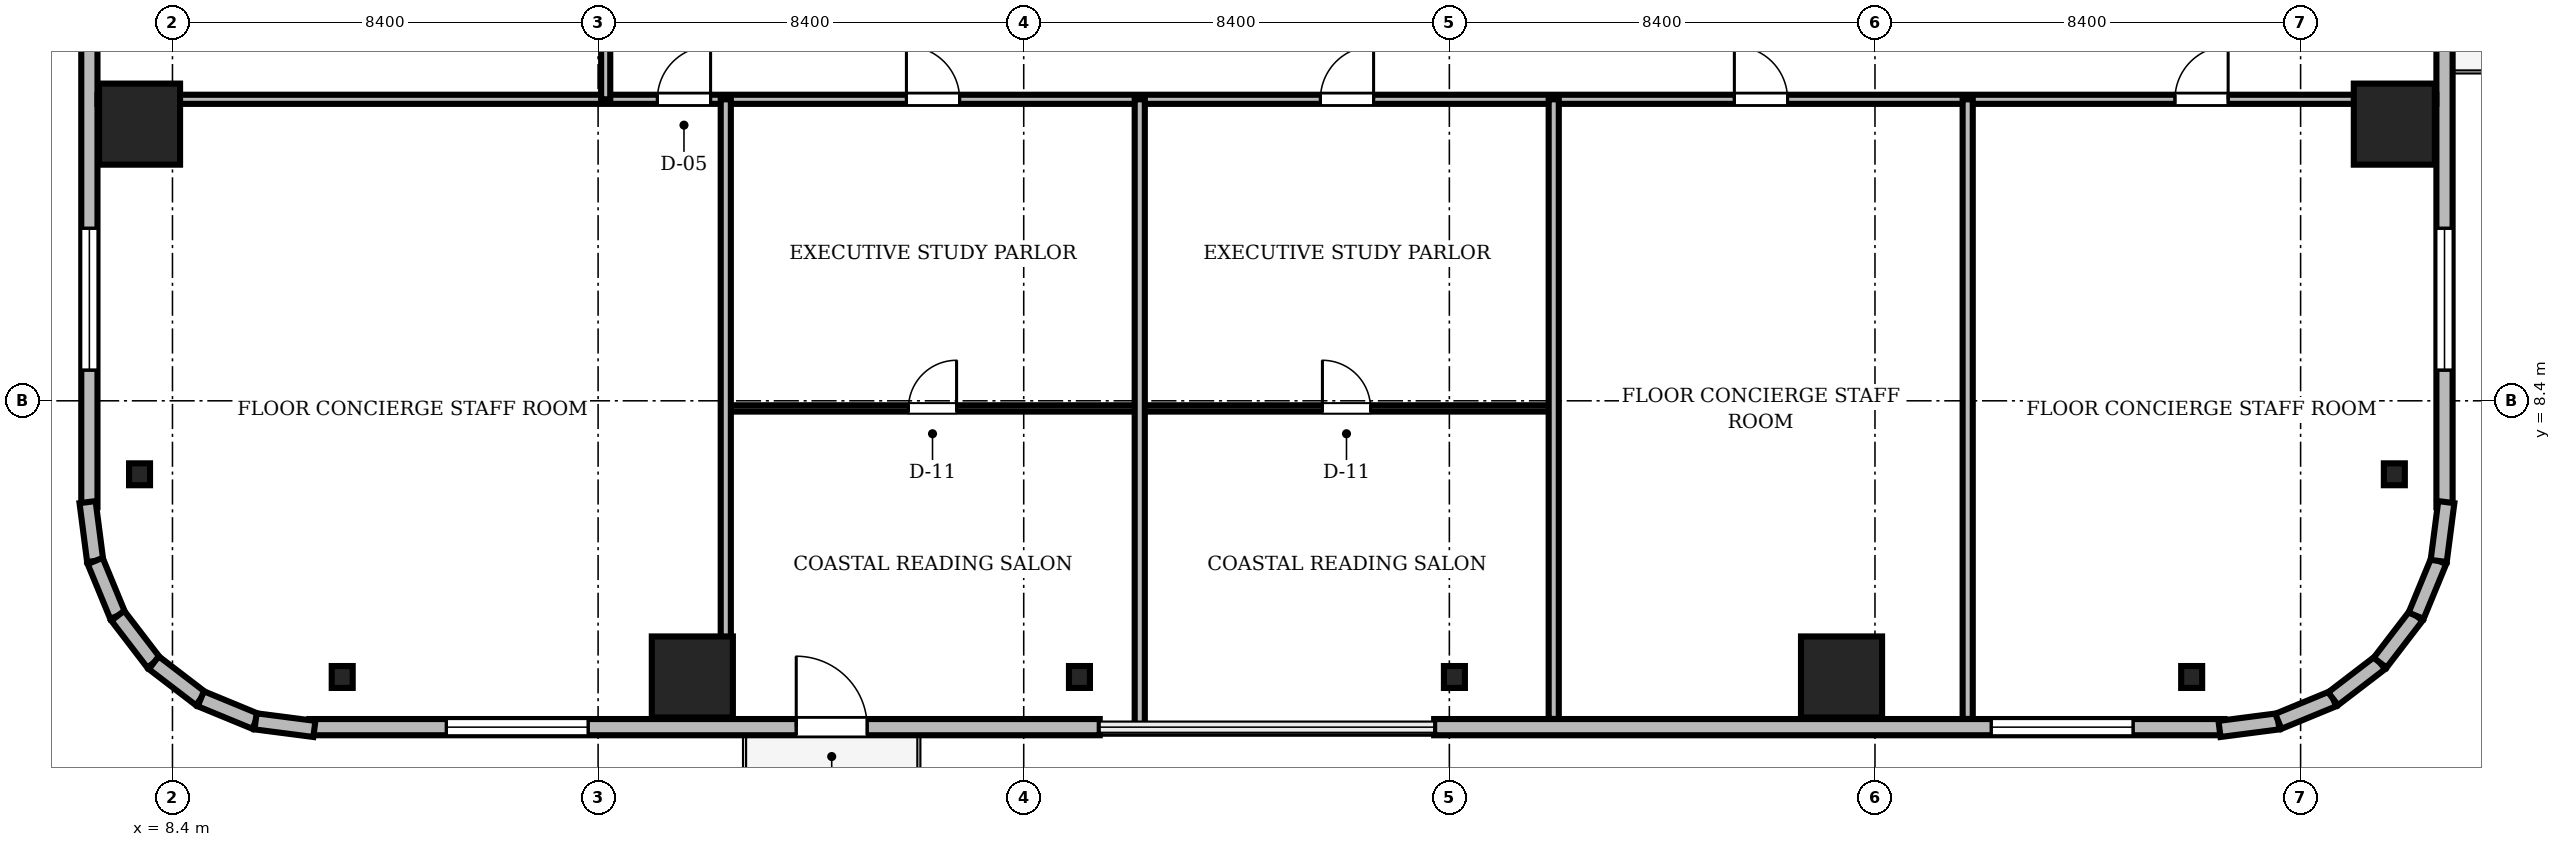
"""IFC4 building model, lengths in metres.
Left out: names, types, materials, properties, quantities, classifications, styles, units other than length and angle.
Written with IfcOpenShell. Run it as: python <this file> out.ifc"""

import sys

from ifc_helpers import new_model, si_unit, direction, frame, frame_2d, origin, origin_2d, place, context, subcontext, project, spatial, rectangle, i_section, extrude, source, transform, mapped, element, fill, save


model = new_model("IFC4")
c1 = context("Model", 3, precision=1e-05, world=origin(), true_north=direction((0.0, 1.0)))
c2 = subcontext(c1, "Body", "Model", "MODEL_VIEW")
j1 = project(units=[si_unit("LENGTHUNIT", "METRE"), si_unit("PLANEANGLEUNIT", "RADIAN")], contexts=[c1])
p1 = place(None, origin())
s1 = spatial("IfcSite", under=j1, at=p1, CompositionType="ELEMENT")
p2 = place(p1, origin())
s2 = spatial("IfcBuilding", under=s1, at=p2, CompositionType="ELEMENT")
p3 = place(p2, frame((0.0, 0.0, 163.1)))
s3 = spatial("IfcBuildingStorey", under=s2, at=p3, CompositionType="ELEMENT", Elevation=163.1)
m1 = source(origin(), c2, "Body", "SweptSolid", [
    extrude(rectangle(XDim=1.6, YDim=1.6, at=origin_2d()), origin(), (0.0, 0.0, 1.0), 3.05),
])
for number, where, z_axis, x_axis in (
    (1, (18.66, 2.95, 0.0), (0.0, 0.0, 1.0), (1.0, 0.0, 0.0)),
    (2, (41.34, 2.95, 0.0), (0.0, 0.0, 1.0), (1.0, 0.0, 0.0)),
    (3, (52.25, 13.86, 0.0), (0.0, 0.0, 1.0), (1.0, 0.0, 0.0)),
    (4, (7.75, 13.86, 0.0), (0.0, 0.0, 1.0), (1.0, 0.0, 0.0)),
):
    element("IfcColumn", number, at=place(p3, frame(where, z_axis=z_axis, x_axis=x_axis)), inside=s3, PredefinedType="COLUMN", context=c2, shape_type="MappedRepresentation", body=[
        mapped(m1, transform((0.0, 0.0, 0.0), scale=1.0)),
    ])
m2 = source(origin(), c2, "Body", "SweptSolid", [
    extrude(i_section(OverallWidth=0.414, OverallDepth=0.432, WebThickness=0.026, FlangeThickness=0.04, FilletRadius=0.015, at=origin_2d()), origin(), (0.0, 0.0, 1.0), 3.05),
])
for number, where, z_axis, x_axis in (
    (5, (11.75, 2.95, 0.0), (0.0, 0.0, 1.0), (1.0, 0.0, 0.0)),
    (6, (26.3, 2.95, 0.0), (0.0, 0.0, 1.0), (1.0, 0.0, 0.0)),
    (7, (33.7, 2.95, 0.0), (0.0, 0.0, 1.0), (1.0, 0.0, 0.0)),
    (8, (48.25, 2.95, 0.0), (0.0, 0.0, 1.0), (1.0, 0.0, 0.0)),
    (9, (52.25, 6.95, 0.0), (0.0, 0.0, 1.0), (1.0, 0.0, 0.0)),
    (10, (7.75, 6.95, 0.0), (0.0, 0.0, 1.0), (1.0, 0.0, 0.0)),
):
    element("IfcColumn", number, at=place(p3, frame(where, z_axis=z_axis, x_axis=x_axis)), inside=s3, PredefinedType="COLUMN", context=c2, shape_type="MappedRepresentation", body=[
        mapped(m2, transform((0.0, 0.0, 0.0), scale=1.0)),
    ])
m3 = source(origin(), c2, "Body", "SweptSolid", [
    extrude(rectangle(XDim=15.6, YDim=0.32, at=frame_2d((7.8, 0.0))), origin(), (0.0, 0.0, 1.0), 3.05),
])
p4 = place(p3, frame((11.1, 1.96, 0.0), z_axis=(0.0, 0.0, 1.0), x_axis=(1.0, 0.0, 0.0)))
e11 = element("IfcWall", 11, at=p4, inside=s3, PredefinedType="SOLIDWALL", context=c2, shape_type="MappedRepresentation", body=[
    mapped(m3, transform((0.0, 0.0, 0.0), scale=1.0)),
])
m4 = source(origin(), c2, "Body", "SweptSolid", [
    extrude(rectangle(XDim=1.4, YDim=2.3, at=frame_2d((0.7, 1.15))), frame((0.0, 0.17, 0.0), z_axis=(0.0, -1.0, 0.0), x_axis=(1.0, 0.0, 0.0)), (0.0, 0.0, 1.0), 0.34),
])
p5 = place(p4, frame((9.61, 0.0, 0.0)))
e12 = element("IfcOpeningElement", 12, at=p5, cuts=e11, PredefinedType="OPENING", context=c2, shape_type="MappedRepresentation", body=[
    mapped(m4, transform((0.0, 0.0, 0.0), scale=1.0)),
])
m5 = source(origin(), c2, "Body", "SweptSolid", [
    extrude(rectangle(XDim=2.8, YDim=2.4, at=frame_2d((1.4, 1.2))), frame((0.0, 0.17, 0.0), z_axis=(0.0, -1.0, 0.0), x_axis=(1.0, 0.0, 0.0)), (0.0, 0.0, 1.0), 0.34),
])
p6 = place(p4, frame((2.705, 0.0, 0.39)))
e13 = element("IfcOpeningElement", 13, at=p6, cuts=e11, PredefinedType="OPENING", context=c2, shape_type="MappedRepresentation", body=[
    mapped(m5, transform((0.0, 0.0, 0.0), scale=1.0)),
])
p7 = place(p3, frame((33.3, 1.96, 0.0), z_axis=(0.0, 0.0, 1.0), x_axis=(1.0, 0.0, 0.0)))
e14 = element("IfcWall", 14, at=p7, inside=s3, PredefinedType="SOLIDWALL", context=c2, shape_type="MappedRepresentation", body=[
    mapped(m3, transform((0.0, 0.0, 0.0), scale=1.0)),
])
p8 = place(p7, frame((10.995, 0.0, 0.39)))
e15 = element("IfcOpeningElement", 15, at=p8, cuts=e14, PredefinedType="OPENING", context=c2, shape_type="MappedRepresentation", body=[
    mapped(m5, transform((0.0, 0.0, 0.0), scale=1.0)),
])
p9 = place(p3, frame((6.76, 21.9, 0.0), z_axis=(0.0, 0.0, 1.0), x_axis=(0.0, -1.0, 0.0)))
e16 = element("IfcWall", 16, at=p9, inside=s3, PredefinedType="SOLIDWALL", context=c2, shape_type="MappedRepresentation", body=[
    mapped(m3, transform((0.0, 0.0, 0.0), scale=1.0)),
])
p10 = place(p9, frame((10.095, 0.0, 0.39)))
e17 = element("IfcOpeningElement", 17, at=p10, cuts=e16, PredefinedType="OPENING", context=c2, shape_type="MappedRepresentation", body=[
    mapped(m5, transform((0.0, 0.0, 0.0), scale=1.0)),
])
p11 = place(p3, frame((53.24, 6.3, 0.0), z_axis=(0.0, 0.0, 1.0), x_axis=(0.0, 1.0, 0.0)))
e18 = element("IfcWall", 18, at=p11, inside=s3, PredefinedType="SOLIDWALL", context=c2, shape_type="MappedRepresentation", body=[
    mapped(m3, transform((0.0, 0.0, 0.0), scale=1.0)),
])
p12 = place(p11, frame((9.61, 0.0, 0.0)))
e19 = element("IfcOpeningElement", 19, at=p12, cuts=e18, PredefinedType="OPENING", context=c2, shape_type="MappedRepresentation", body=[
    mapped(m4, transform((0.0, 0.0, 0.0), scale=1.0)),
])
p13 = place(p11, frame((2.705, 0.0, 0.39)))
e20 = element("IfcOpeningElement", 20, at=p13, cuts=e18, PredefinedType="OPENING", context=c2, shape_type="MappedRepresentation", body=[
    mapped(m5, transform((0.0, 0.0, 0.0), scale=1.0)),
])
m6 = source(origin(), c2, "Body", "SweptSolid", [
    extrude(rectangle(XDim=1.171, YDim=0.32, at=frame_2d((0.585, 0.0))), origin(), (0.0, 0.0, 1.0), 3.05),
])
p14 = place(p3, frame((6.724, 6.401, 0.0), z_axis=(0.0, 0.0, 1.0), x_axis=(0.128269133229, -0.991739395941, 0.0)))
e21 = element("IfcWall", 21, at=p14, inside=s3, PredefinedType="SOLIDWALL", context=c2, shape_type="MappedRepresentation", body=[
    mapped(m6, transform((0.0, 0.0, 0.0), scale=1.0)),
])
m7 = source(origin(), c2, "Body", "SweptSolid", [
    extrude(rectangle(XDim=1.169, YDim=0.32, at=frame_2d((0.584, 0.0))), origin(), (0.0, 0.0, 1.0), 3.05),
])
for number, where, z_axis, x_axis in (
    (22, (6.875, 5.24, 0.0), (0.0, 0.0, 1.0), (0.381, -0.925, 0.0)),
    (23, (7.32, 4.159, 0.0), (0.0, 0.0, 1.0), (0.608, -0.794, 0.0)),
):
    element("IfcWall", number, at=place(p3, frame(where, z_axis=z_axis, x_axis=x_axis)), inside=s3, PredefinedType="SOLIDWALL", context=c2, shape_type="MappedRepresentation", body=[
        mapped(m7, transform((0.0, 0.0, 0.0), scale=1.0)),
    ])
m8 = source(origin(), c2, "Body", "SweptSolid", [
    extrude(rectangle(XDim=1.169, YDim=0.32, at=frame_2d((0.584, 0.0))), origin(), (0.0, 0.0, 1.0), 3.05),
])
p15 = place(p3, frame((8.031, 3.231, 0.0), z_axis=(0.0, 0.0, 1.0), x_axis=(0.793663520347, -0.608356981114, 0.0)))
e24 = element("IfcWall", 24, at=p15, inside=s3, PredefinedType="SOLIDWALL", context=c2, shape_type="MappedRepresentation", body=[
    mapped(m8, transform((0.0, 0.0, 0.0), scale=1.0)),
])
m9 = source(origin(), c2, "Body", "SweptSolid", [
    extrude(rectangle(XDim=1.169, YDim=0.32, at=frame_2d((0.585, 0.0))), origin(), (0.0, 0.0, 1.0), 3.05),
])
p16 = place(p3, frame((8.959, 2.52, 0.0), z_axis=(0.0, 0.0, 1.0), x_axis=(0.924479075121, -0.381232789334, 0.0)))
e25 = element("IfcWall", 25, at=p16, inside=s3, PredefinedType="SOLIDWALL", context=c2, shape_type="MappedRepresentation", body=[
    mapped(m9, transform((0.0, 0.0, 0.0), scale=1.0)),
])
m10 = source(origin(), c2, "Body", "SweptSolid", [
    extrude(rectangle(XDim=1.17, YDim=0.32, at=frame_2d((0.585, 0.0))), origin(), (0.0, 0.0, 1.0), 3.05),
])
for number, where, z_axis, x_axis in (
    (26, (10.04, 2.074, 0.0), (0.0, 0.0, 1.0), (0.992, -0.128, 0.0)),
    (27, (48.8, 1.925, 0.0), (0.0, 0.0, 1.0), (0.992, 0.128, 0.0)),
):
    element("IfcWall", number, at=place(p3, frame(where, z_axis=z_axis, x_axis=x_axis)), inside=s3, PredefinedType="SOLIDWALL", context=c2, shape_type="MappedRepresentation", body=[
        mapped(m10, transform((0.0, 0.0, 0.0), scale=1.0)),
    ])
p17 = place(p3, frame((49.96, 2.074, 0.0), z_axis=(0.0, 0.0, 1.0), x_axis=(0.924479075121, 0.381232789334, 0.0)))
e28 = element("IfcWall", 28, at=p17, inside=s3, PredefinedType="SOLIDWALL", context=c2, shape_type="MappedRepresentation", body=[
    mapped(m9, transform((0.0, 0.0, 0.0), scale=1.0)),
])
p18 = place(p3, frame((51.041, 2.52, 0.0), z_axis=(0.0, 0.0, 1.0), x_axis=(0.793663520347, 0.608356981114, 0.0)))
e29 = element("IfcWall", 29, at=p18, inside=s3, PredefinedType="SOLIDWALL", context=c2, shape_type="MappedRepresentation", body=[
    mapped(m8, transform((0.0, 0.0, 0.0), scale=1.0)),
])
for number, where, z_axis, x_axis in (
    (30, (51.969, 3.231, 0.0), (0.0, 0.0, 1.0), (0.608, 0.794, 0.0)),
    (31, (52.68, 4.159, 0.0), (0.0, 0.0, 1.0), (0.381, 0.925, 0.0)),
):
    element("IfcWall", number, at=place(p3, frame(where, z_axis=z_axis, x_axis=x_axis)), inside=s3, PredefinedType="SOLIDWALL", context=c2, shape_type="MappedRepresentation", body=[
        mapped(m7, transform((0.0, 0.0, 0.0), scale=1.0)),
    ])
p19 = place(p3, frame((53.125, 5.24, 0.0), z_axis=(0.0, 0.0, 1.0), x_axis=(0.128269133229, 0.991739395941, 0.0)))
e32 = element("IfcWall", 32, at=p19, inside=s3, PredefinedType="SOLIDWALL", context=c2, shape_type="MappedRepresentation", body=[
    mapped(m6, transform((0.0, 0.0, 0.0), scale=1.0)),
])
m11 = source(origin(), c2, "Body", "SweptSolid", [
    extrude(rectangle(XDim=46.156, YDim=0.18, at=frame_2d((23.078, 0.0))), origin(), (0.0, 0.0, 1.0), 2.326),
])
p20 = place(p3, frame((6.922, 14.35, 0.0), z_axis=(0.0, 0.0, 1.0), x_axis=(1.0, 0.0, 0.0)))
e33 = element("IfcWall", 33, at=p20, inside=s3, PredefinedType="PARTITIONING", context=c2, shape_type="MappedRepresentation", body=[
    mapped(m11, transform((0.0, 0.0, 0.0), scale=1.0)),
])
m12 = source(origin(), c2, "Body", "SweptSolid", [
    extrude(rectangle(XDim=1.05, YDim=2.2, at=frame_2d((0.525, 1.1))), frame((0.0, 0.1, 0.0), z_axis=(0.0, -1.0, 0.0), x_axis=(1.0, 0.0, 0.0)), (0.0, 0.0, 1.0), 0.2),
])
p21 = place(p20, frame((11.048, 0.0, 0.0)))
e34 = element("IfcOpeningElement", 34, at=p21, cuts=e33, PredefinedType="OPENING", context=c2, shape_type="MappedRepresentation", body=[
    mapped(m12, transform((0.0, 0.0, 0.0), scale=1.0)),
])
p22 = place(p20, frame((15.963, 0.0, 0.0)))
e35 = element("IfcOpeningElement", 35, at=p22, cuts=e33, PredefinedType="OPENING", context=c2, shape_type="MappedRepresentation", body=[
    mapped(m12, transform((0.0, 0.0, 0.0), scale=1.0)),
])
p23 = place(p20, frame((24.133, 0.0, 0.0)))
e36 = element("IfcOpeningElement", 36, at=p23, cuts=e33, PredefinedType="OPENING", context=c2, shape_type="MappedRepresentation", body=[
    mapped(m12, transform((0.0, 0.0, 0.0), scale=1.0)),
])
p24 = place(p20, frame((32.303, 0.0, 0.0)))
e37 = element("IfcOpeningElement", 37, at=p24, cuts=e33, PredefinedType="OPENING", context=c2, shape_type="MappedRepresentation", body=[
    mapped(m12, transform((0.0, 0.0, 0.0), scale=1.0)),
])
p25 = place(p20, frame((40.998, 0.0, 0.0)))
e38 = element("IfcOpeningElement", 38, at=p25, cuts=e33, PredefinedType="OPENING", context=c2, shape_type="MappedRepresentation", body=[
    mapped(m12, transform((0.0, 0.0, 0.0), scale=1.0)),
])
m13 = source(origin(), c2, "Body", "SweptSolid", [
    extrude(rectangle(XDim=8.17, YDim=0.125, at=frame_2d((4.085, 0.0))), origin(), (0.0, 0.0, 1.0), 2.492),
])
p26 = place(p3, frame((19.32, 8.25, 0.0), z_axis=(0.0, 0.0, 1.0), x_axis=(1.0, 0.0, 0.0)))
e39 = element("IfcWall", 39, at=p26, inside=s3, PredefinedType="PARTITIONING", context=c2, shape_type="MappedRepresentation", body=[
    mapped(m13, transform((0.0, 0.0, 0.0), scale=1.0)),
])
m14 = source(origin(), c2, "Body", "SweptSolid", [
    extrude(rectangle(XDim=0.95, YDim=2.15, at=frame_2d((0.475, 1.075))), frame((0.0, 0.073, 0.0), z_axis=(0.0, -1.0, 0.0), x_axis=(1.0, 0.0, 0.0)), (0.0, 0.0, 1.0), 0.145),
])
p27 = place(p26, frame((3.605, 0.0, 0.0)))
e40 = element("IfcOpeningElement", 40, at=p27, cuts=e39, PredefinedType="OPENING", context=c2, shape_type="MappedRepresentation", body=[
    mapped(m14, transform((0.0, 0.0, 0.0), scale=1.0)),
])
p28 = place(p3, frame((27.49, 8.25, 0.0), z_axis=(0.0, 0.0, 1.0), x_axis=(1.0, 0.0, 0.0)))
e41 = element("IfcWall", 41, at=p28, inside=s3, PredefinedType="PARTITIONING", context=c2, shape_type="MappedRepresentation", body=[
    mapped(m13, transform((0.0, 0.0, 0.0), scale=1.0)),
])
p29 = place(p28, frame((3.605, 0.0, 0.0)))
e42 = element("IfcOpeningElement", 42, at=p29, cuts=e41, PredefinedType="OPENING", context=c2, shape_type="MappedRepresentation", body=[
    mapped(m14, transform((0.0, 0.0, 0.0), scale=1.0)),
])
m15 = source(origin(), c2, "Body", "SweptSolid", [
    extrude(rectangle(XDim=14.2, YDim=0.18, at=frame_2d((7.1, 0.0))), origin(), (0.0, 0.0, 1.0), 2.492),
])
p30 = place(p3, frame((16.95, 14.35, 0.0), z_axis=(0.0, 0.0, 1.0), x_axis=(0.0, 1.0, 0.0)))
e43 = element("IfcWall", 43, at=p30, inside=s3, PredefinedType="PARTITIONING", context=c2, shape_type="MappedRepresentation", body=[
    mapped(m15, transform((0.0, 0.0, 0.0), scale=1.0)),
])
m16 = source(origin(), c2, "Body", "SweptSolid", [
    extrude(rectangle(XDim=12.228, YDim=0.2, at=frame_2d((6.114, 0.0))), origin(), (0.0, 0.0, 1.0), 2.326),
])
p31 = place(p3, frame((19.32, 2.122, 0.0), z_axis=(0.0, 0.0, 1.0), x_axis=(0.0, 1.0, 0.0)))
e44 = element("IfcWall", 44, at=p31, inside=s3, PredefinedType="PARTITIONING", context=c2, shape_type="MappedRepresentation", body=[
    mapped(m16, transform((0.0, 0.0, 0.0), scale=1.0)),
])
m17 = source(origin(), c2, "Body", "SweptSolid", [
    extrude(rectangle(XDim=12.42, YDim=0.2, at=frame_2d((6.21, 0.0))), origin(), (0.0, 0.0, 1.0), 2.326),
])
p32 = place(p3, frame((27.49, 1.93, 0.0), z_axis=(0.0, 0.0, 1.0), x_axis=(0.0, 1.0, 0.0)))
e45 = element("IfcWall", 45, at=p32, inside=s3, PredefinedType="PARTITIONING", context=c2, shape_type="MappedRepresentation", body=[
    mapped(m17, transform((0.0, 0.0, 0.0), scale=1.0)),
])
for number, where, z_axis, x_axis in (
    (46, (35.66, 2.122, 0.0), (0.0, 0.0, 1.0), (0.0, 1.0, 0.0)),
    (47, (43.83, 2.122, 0.0), (0.0, 0.0, 1.0), (0.0, 1.0, 0.0)),
):
    element("IfcWall", number, at=place(p3, frame(where, z_axis=z_axis, x_axis=x_axis)), inside=s3, PredefinedType="PARTITIONING", context=c2, shape_type="MappedRepresentation", body=[
        mapped(m16, transform((0.0, 0.0, 0.0), scale=1.0)),
    ])
m18 = source(origin(), c2, "Body", "SweptSolid", [
    extrude(rectangle(XDim=1.4, YDim=2.3, at=frame_2d((0.7, 1.15))), frame((0.0, 0.025, 0.0), z_axis=(0.0, -1.0, 0.0), x_axis=(1.0, 0.0, 0.0)), (0.0, 0.0, 1.0), 0.05),
])
p33 = place(p5, frame((1.4, 0.0, 0.0), z_axis=(0.0, 0.0, 1.0), x_axis=(-1.0, 0.0, 0.0)))
e48 = element("IfcDoor", 48, at=p33, inside=s3, OperationType="DOUBLE_DOOR_SLIDING", PredefinedType="DOOR", context=c2, shape_type="MappedRepresentation", body=[
    mapped(m18, transform((0.0, 0.0, 0.0), scale=1.0)),
])
fill(e12, e48)
m19 = source(origin(), c2, "Body", "SweptSolid", [
    extrude(rectangle(XDim=2.8, YDim=2.4, at=frame_2d((1.4, 1.2))), frame((0.0, 0.03, 0.0), z_axis=(0.0, -1.0, 0.0), x_axis=(1.0, 0.0, 0.0)), (0.0, 0.0, 1.0), 0.06),
])
p34 = place(p6, origin())
e49 = element("IfcWindow", 49, at=p34, inside=s3, PartitioningType="SINGLE_PANEL", PredefinedType="WINDOW", context=c2, shape_type="MappedRepresentation", body=[
    mapped(m19, transform((0.0, 0.0, 0.0), scale=1.0)),
])
fill(e13, e49)
p35 = place(p8, origin())
e50 = element("IfcWindow", 50, at=p35, inside=s3, PartitioningType="SINGLE_PANEL", PredefinedType="WINDOW", context=c2, shape_type="MappedRepresentation", body=[
    mapped(m19, transform((0.0, 0.0, 0.0), scale=1.0)),
])
fill(e15, e50)
p36 = place(p10, origin())
e51 = element("IfcWindow", 51, at=p36, inside=s3, PartitioningType="SINGLE_PANEL", PredefinedType="WINDOW", context=c2, shape_type="MappedRepresentation", body=[
    mapped(m19, transform((0.0, 0.0, 0.0), scale=1.0)),
])
fill(e17, e51)
p37 = place(p13, origin())
e52 = element("IfcWindow", 52, at=p37, inside=s3, PartitioningType="SINGLE_PANEL", PredefinedType="WINDOW", context=c2, shape_type="MappedRepresentation", body=[
    mapped(m19, transform((0.0, 0.0, 0.0), scale=1.0)),
])
fill(e20, e52)
m20 = source(origin(), c2, "Body", "SweptSolid", [
    extrude(rectangle(XDim=1.05, YDim=2.2, at=frame_2d((0.525, 1.1))), frame((0.0, 0.025, 0.0), z_axis=(0.0, -1.0, 0.0), x_axis=(1.0, 0.0, 0.0)), (0.0, 0.0, 1.0), 0.05),
])
p38 = place(p21, origin())
e53 = element("IfcDoor", 53, at=p38, inside=s3, OperationType="SINGLE_SWING_RIGHT", PredefinedType="DOOR", context=c2, shape_type="MappedRepresentation", body=[
    mapped(m20, transform((0.0, 0.0, 0.0), scale=1.0)),
])
fill(e34, e53)
p39 = place(p22, origin())
e54 = element("IfcDoor", 54, at=p39, inside=s3, OperationType="SINGLE_SWING_LEFT", PredefinedType="DOOR", context=c2, shape_type="MappedRepresentation", body=[
    mapped(m20, transform((0.0, 0.0, 0.0), scale=1.0)),
])
fill(e35, e54)
p40 = place(p23, origin())
e55 = element("IfcDoor", 55, at=p40, inside=s3, OperationType="SINGLE_SWING_RIGHT", PredefinedType="DOOR", context=c2, shape_type="MappedRepresentation", body=[
    mapped(m20, transform((0.0, 0.0, 0.0), scale=1.0)),
])
fill(e36, e55)
p41 = place(p24, origin())
e56 = element("IfcDoor", 56, at=p41, inside=s3, OperationType="SINGLE_SWING_LEFT", PredefinedType="DOOR", context=c2, shape_type="MappedRepresentation", body=[
    mapped(m20, transform((0.0, 0.0, 0.0), scale=1.0)),
])
fill(e37, e56)
p42 = place(p25, origin())
e57 = element("IfcDoor", 57, at=p42, inside=s3, OperationType="SINGLE_SWING_RIGHT", PredefinedType="DOOR", context=c2, shape_type="MappedRepresentation", body=[
    mapped(m20, transform((0.0, 0.0, 0.0), scale=1.0)),
])
fill(e38, e57)
m21 = source(origin(), c2, "Body", "SweptSolid", [
    extrude(rectangle(XDim=0.95, YDim=2.15, at=frame_2d((0.475, 1.075))), frame((0.0, 0.025, 0.0), z_axis=(0.0, -1.0, 0.0), x_axis=(1.0, 0.0, 0.0)), (0.0, 0.0, 1.0), 0.05),
])
p43 = place(p27, origin())
e58 = element("IfcDoor", 58, at=p43, inside=s3, OperationType="SINGLE_SWING_RIGHT", PredefinedType="DOOR", context=c2, shape_type="MappedRepresentation", body=[
    mapped(m21, transform((0.0, 0.0, 0.0), scale=1.0)),
])
fill(e40, e58)
p44 = place(p29, origin())
e59 = element("IfcDoor", 59, at=p44, inside=s3, OperationType="SINGLE_SWING_LEFT", PredefinedType="DOOR", context=c2, shape_type="MappedRepresentation", body=[
    mapped(m21, transform((0.0, 0.0, 0.0), scale=1.0)),
])
fill(e42, e59)
save(model, sys.argv[1])
